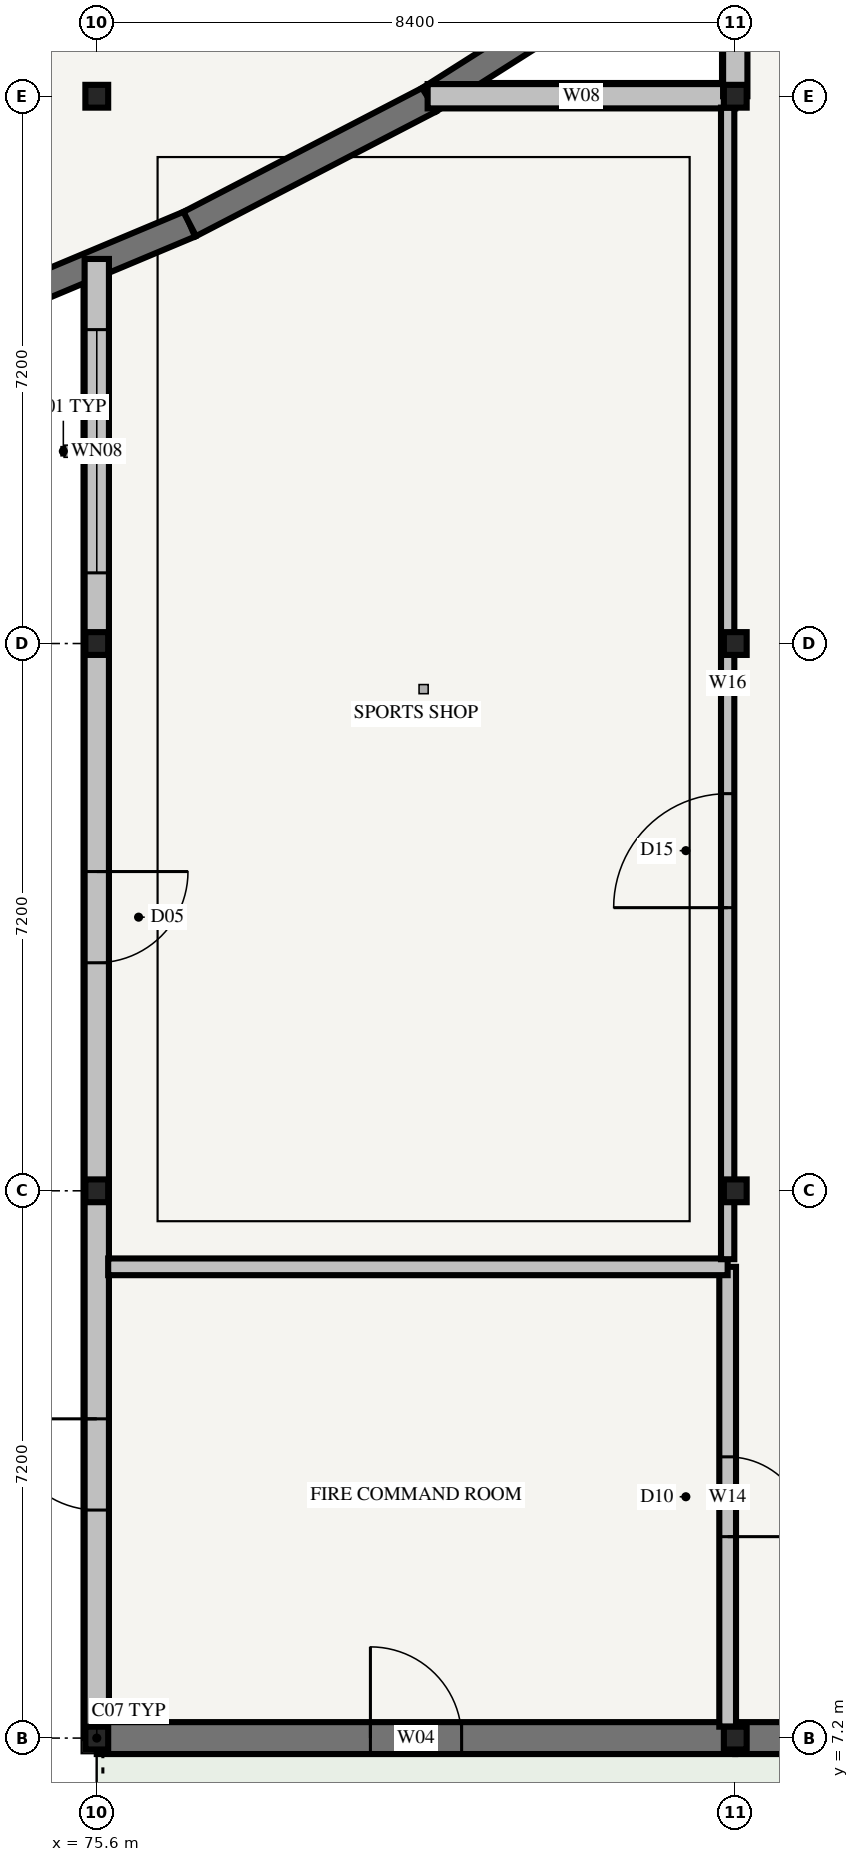
"""IFC4 building model, lengths in metres.
Left out: names, types, materials, properties, quantities, classifications, styles, units other than length and angle.
Written with IfcOpenShell. Run it as: python <this file> out.ifc"""

import sys

from ifc_helpers import new_model, si_unit, direction, frame, frame_2d, origin, origin_2d, place, context, subcontext, project, spatial, rectangle, i_section, extrude, element, fill, save


model = new_model("IFC4")
c1 = context("Model", 3, precision=1e-05, world=origin(), true_north=direction((0.0, 1.0)))
c2 = subcontext(c1, "Body", "Model", "MODEL_VIEW")
j1 = project(units=[si_unit("LENGTHUNIT", "METRE"), si_unit("PLANEANGLEUNIT", "RADIAN")], contexts=[c1])
p1 = place(None, origin())
s1 = spatial("IfcSite", under=j1, at=p1, CompositionType="ELEMENT")
p2 = place(p1, origin())
s2 = spatial("IfcBuilding", under=s1, at=p2, CompositionType="ELEMENT")
p3 = place(p2, origin())
s3 = spatial("IfcBuildingStorey", under=s2, at=p3, CompositionType="ELEMENT", Elevation=0.0)
for number, where, z_axis, x_axis in (
    (1, (75.6, 7.2, -0.42), (0.0, 0.0, 1.0), (1.0, 0.0, 0.0)),
    (2, (75.6, 14.4, -0.42), (0.0, 0.0, 1.0), (1.0, 0.0, 0.0)),
    (3, (75.6, 21.6, -0.42), (0.0, 0.0, 1.0), (1.0, 0.0, 0.0)),
    (4, (75.6, 28.8, -0.42), (0.0, 0.0, 1.0), (1.0, 0.0, 0.0)),
    (5, (84.0, 7.2, -0.42), (0.0, 0.0, 1.0), (1.0, 0.0, 0.0)),
    (6, (84.0, 14.4, -0.42), (0.0, 0.0, 1.0), (1.0, 0.0, 0.0)),
    (7, (84.0, 21.6, -0.42), (0.0, 0.0, 1.0), (1.0, 0.0, 0.0)),
    (8, (84.0, 28.8, -0.42), (0.0, 0.0, 1.0), (1.0, 0.0, 0.0)),
):
    element("IfcColumn", number, at=place(p3, frame(where, z_axis=z_axis, x_axis=x_axis)), inside=s3, PredefinedType="COLUMN", context=c2, shape_type="SweptSolid", body=[
        extrude(i_section(OverallWidth=0.3, OverallDepth=0.3, WebThickness=0.011, FlangeThickness=0.019, FilletRadius=0.027, at=origin_2d()), origin(), (0.0, 0.0, 1.0), 4.92),
    ])
p4 = place(p3, frame((73.456, 25.706, 0.0), z_axis=(0.0, 0.0, 1.0), x_axis=(0.922130522386, 0.386878921219, 0.0)))
e9 = element("IfcWall", 9, at=p4, inside=s3, PredefinedType="STANDARD", context=c2, shape_type="SweptSolid", body=[
    extrude(rectangle(XDim=3.651, YDim=0.36, at=frame_2d((1.826, 0.0))), origin(), (0.0, 0.0, 1.0), 4.01),
])
p5 = place(p3, frame((76.823, 27.119, 0.0), z_axis=(0.0, 0.0, 1.0), x_axis=(0.887548498586, 0.46071429613, 0.0)))
e10 = element("IfcWall", 10, at=p5, inside=s3, PredefinedType="STANDARD", context=c2, shape_type="SweptSolid", body=[
    extrude(rectangle(XDim=3.552, YDim=0.36, at=frame_2d((1.776, 0.0))), origin(), (0.0, 0.0, 1.0), 4.01),
])
p6 = place(p3, frame((79.976, 28.756, 0.0), z_axis=(0.0, 0.0, 1.0), x_axis=(0.844367033968, 0.535765164926, 0.0)))
e11 = element("IfcWall", 11, at=p6, inside=s3, PredefinedType="STANDARD", context=c2, shape_type="SweptSolid", body=[
    extrude(rectangle(XDim=3.445, YDim=0.36, at=frame_2d((1.722, 0.0))), origin(), (0.0, 0.0, 1.0), 4.01),
])
p7 = place(p3, frame((84.0, 28.8, 0.0), z_axis=(0.0, 0.0, 1.0), x_axis=(-1.0, 0.0, 0.0)))
e12 = element("IfcWall", 12, at=p7, inside=s3, PredefinedType="STANDARD", context=c2, shape_type="SweptSolid", body=[
    extrude(rectangle(XDim=4.047, YDim=0.32, at=frame_2d((2.023, 0.0))), origin(), (0.0, 0.0, 1.0), 3.705),
])
p8 = place(p3, frame((75.6, 26.659, 0.0), z_axis=(0.0, 0.0, 1.0), x_axis=(0.0, -1.0, 0.0)))
e13 = element("IfcWall", 13, at=p8, inside=s3, PredefinedType="STANDARD", context=c2, shape_type="SweptSolid", body=[
    extrude(rectangle(XDim=5.059, YDim=0.32, at=frame_2d((2.53, 0.0))), origin(), (0.0, 0.0, 1.0), 3.805),
])
p9 = place(p8, frame((0.93, 0.0, 2.1)))
e14 = element("IfcOpeningElement", 14, at=p9, cuts=e13, PredefinedType="OPENING", context=c2, shape_type="SweptSolid", body=[
    extrude(rectangle(XDim=3.2, YDim=1.2, at=frame_2d((1.6, 0.6))), frame((0.0, 0.185, 0.0), z_axis=(0.0, -1.0, 0.0), x_axis=(1.0, 0.0, 0.0)), (0.0, 0.0, 1.0), 0.37),
])
p10 = place(p3, frame((75.6, 21.6, 0.0), z_axis=(0.0, 0.0, 1.0), x_axis=(0.0, -1.0, 0.0)))
e15 = element("IfcWall", 15, at=p10, inside=s3, PredefinedType="STANDARD", context=c2, shape_type="SweptSolid", body=[
    extrude(rectangle(XDim=7.2, YDim=0.32, at=frame_2d((3.6, 0.0))), origin(), (0.0, 0.0, 1.0), 3.805),
])
p11 = place(p10, frame((3.0, 0.0, 0.0)))
e16 = element("IfcOpeningElement", 16, at=p11, cuts=e15, PredefinedType="OPENING", context=c2, shape_type="SweptSolid", body=[
    extrude(rectangle(XDim=1.2, YDim=2.25, at=frame_2d((0.6, 1.125))), frame((0.0, 0.185, 0.0), z_axis=(0.0, -1.0, 0.0), x_axis=(1.0, 0.0, 0.0)), (0.0, 0.0, 1.0), 0.37),
])
p12 = place(p3, frame((75.6, 14.4, 0.0), z_axis=(0.0, 0.0, 1.0), x_axis=(0.0, -1.0, 0.0)))
e17 = element("IfcWall", 17, at=p12, inside=s3, PredefinedType="STANDARD", context=c2, shape_type="SweptSolid", body=[
    extrude(rectangle(XDim=7.2, YDim=0.32, at=frame_2d((3.6, 0.0))), origin(), (0.0, 0.0, 1.0), 3.805),
])
p13 = place(p12, frame((3.0, 0.0, 0.0)))
e18 = element("IfcOpeningElement", 18, at=p13, cuts=e17, PredefinedType="OPENING", context=c2, shape_type="SweptSolid", body=[
    extrude(rectangle(XDim=1.2, YDim=2.25, at=frame_2d((0.6, 1.125))), frame((0.0, 0.185, 0.0), z_axis=(0.0, -1.0, 0.0), x_axis=(1.0, 0.0, 0.0)), (0.0, 0.0, 1.0), 0.37),
])
p14 = place(p3, frame((75.6, 7.2, 0.0), z_axis=(0.0, 0.0, 1.0), x_axis=(1.0, 0.0, 0.0)))
e19 = element("IfcWall", 19, at=p14, inside=s3, PredefinedType="SOLIDWALL", context=c2, shape_type="SweptSolid", body=[
    extrude(rectangle(XDim=8.4, YDim=0.42, at=frame_2d((4.2, 0.0))), origin(), (0.0, 0.0, 1.0), 3.805),
])
p15 = place(p14, frame((3.6, 0.0, 0.0)))
e20 = element("IfcOpeningElement", 20, at=p15, cuts=e19, PredefinedType="OPENING", context=c2, shape_type="SweptSolid", body=[
    extrude(rectangle(XDim=1.2, YDim=2.25, at=frame_2d((0.6, 1.125))), frame((0.0, 0.235, 0.0), z_axis=(0.0, -1.0, 0.0), x_axis=(1.0, 0.0, 0.0)), (0.0, 0.0, 1.0), 0.47),
])
p16 = place(p3, frame((84.0, 7.2, 0.0), z_axis=(0.0, 0.0, 1.0), x_axis=(1.0, 0.0, 0.0)))
e21 = element("IfcWall", 21, at=p16, inside=s3, PredefinedType="SOLIDWALL", context=c2, shape_type="SweptSolid", body=[
    extrude(rectangle(XDim=8.4, YDim=0.42, at=frame_2d((4.2, 0.0))), origin(), (0.0, 0.0, 1.0), 3.855),
])
p17 = place(p16, frame((3.0, 0.0, 0.0)))
e22 = element("IfcOpeningElement", 22, at=p17, cuts=e21, PredefinedType="OPENING", context=c2, shape_type="SweptSolid", body=[
    extrude(rectangle(XDim=2.4, YDim=2.7, at=frame_2d((1.2, 1.35))), frame((0.0, 0.235, 0.0), z_axis=(0.0, -1.0, 0.0), x_axis=(1.0, 0.0, 0.0)), (0.0, 0.0, 1.0), 0.47),
])
p18 = place(p3, frame((84.0, 31.525, 0.0), z_axis=(0.0, 0.0, 1.0), x_axis=(0.0, -1.0, 0.0)))
e23 = element("IfcWall", 23, at=p18, inside=s3, PredefinedType="STANDARD", context=c2, shape_type="SweptSolid", body=[
    extrude(rectangle(XDim=2.725, YDim=0.32, at=frame_2d((1.362, 0.0))), origin(), (0.0, 0.0, 1.0), 3.705),
])
p19 = place(p3, frame((83.9, 7.35, 0.0), z_axis=(0.0, 0.0, 1.0), x_axis=(0.0, 1.0, 0.0)))
e24 = element("IfcWall", 24, at=p19, inside=s3, PredefinedType="PARTITIONING", context=c2, shape_type="SweptSolid", body=[
    extrude(rectangle(XDim=6.05, YDim=0.22, at=frame_2d((3.025, 0.0))), origin(), (0.0, 0.0, 1.0), 3.62),
])
p20 = place(p19, frame((2.5, 0.0, 0.0)))
e25 = element("IfcOpeningElement", 25, at=p20, cuts=e24, PredefinedType="OPENING", context=c2, shape_type="SweptSolid", body=[
    extrude(rectangle(XDim=1.05, YDim=2.15, at=frame_2d((0.525, 1.075))), frame((0.0, 0.135, 0.0), z_axis=(0.0, -1.0, 0.0), x_axis=(1.0, 0.0, 0.0)), (0.0, 0.0, 1.0), 0.27),
])
p21 = place(p3, frame((75.75, 13.4, 0.0), z_axis=(0.0, 0.0, 1.0), x_axis=(1.0, 0.0, 0.0)))
e26 = element("IfcWall", 26, at=p21, inside=s3, PredefinedType="PARTITIONING", context=c2, shape_type="SweptSolid", body=[
    extrude(rectangle(XDim=8.15, YDim=0.22, at=frame_2d((4.075, 0.0))), origin(), (0.0, 0.0, 1.0), 3.62),
])
p22 = place(p3, frame((83.9, 13.5, 0.0), z_axis=(0.0, 0.0, 1.0), x_axis=(0.0, 1.0, 0.0)))
e27 = element("IfcWall", 27, at=p22, inside=s3, PredefinedType="PARTITIONING", context=c2, shape_type="SweptSolid", body=[
    extrude(rectangle(XDim=15.15, YDim=0.175, at=frame_2d((7.575, 0.0))), origin(), (0.0, 0.0, 1.0), 3.62),
])
p23 = place(p22, frame((4.625, 0.0, 0.0)))
e28 = element("IfcOpeningElement", 28, at=p23, cuts=e27, PredefinedType="OPENING", context=c2, shape_type="SweptSolid", body=[
    extrude(rectangle(XDim=1.5, YDim=2.2, at=frame_2d((0.75, 1.1))), frame((0.0, 0.112, 0.0), z_axis=(0.0, -1.0, 0.0), x_axis=(1.0, 0.0, 0.0)), (0.0, 0.0, 1.0), 0.225),
])
p24 = place(p9, origin())
e29 = element("IfcWindow", 29, at=p24, inside=s3, PartitioningType="SINGLE_PANEL", PredefinedType="WINDOW", context=c2, shape_type="SweptSolid", body=[
    extrude(rectangle(XDim=3.2, YDim=1.2, at=frame_2d((1.6, 0.6))), frame((0.0, 0.03, 0.0), z_axis=(0.0, -1.0, 0.0), x_axis=(1.0, 0.0, 0.0)), (0.0, 0.0, 1.0), 0.06),
])
fill(e14, e29)
p25 = place(p11, frame((1.2, 0.0, 0.0), z_axis=(0.0, 0.0, 1.0), x_axis=(-1.0, 0.0, 0.0)))
e30 = element("IfcDoor", 30, at=p25, inside=s3, OperationType="SINGLE_SWING_LEFT", PredefinedType="DOOR", context=c2, shape_type="SweptSolid", body=[
    extrude(rectangle(XDim=1.2, YDim=2.25, at=frame_2d((0.6, 1.125))), frame((0.0, 0.025, 0.0), z_axis=(0.0, -1.0, 0.0), x_axis=(1.0, 0.0, 0.0)), (0.0, 0.0, 1.0), 0.05),
])
fill(e16, e30)
p26 = place(p13, frame((1.2, 0.0, 0.0), z_axis=(0.0, 0.0, 1.0), x_axis=(-1.0, 0.0, 0.0)))
e31 = element("IfcDoor", 31, at=p26, inside=s3, OperationType="SINGLE_SWING_RIGHT", PredefinedType="DOOR", context=c2, shape_type="SweptSolid", body=[
    extrude(rectangle(XDim=1.2, YDim=2.25, at=frame_2d((0.6, 1.125))), frame((0.0, 0.025, 0.0), z_axis=(0.0, -1.0, 0.0), x_axis=(1.0, 0.0, 0.0)), (0.0, 0.0, 1.0), 0.05),
])
fill(e18, e31)
p27 = place(p15, frame((1.2, 0.0, 0.0), z_axis=(0.0, 0.0, 1.0), x_axis=(-1.0, 0.0, 0.0)))
e32 = element("IfcDoor", 32, at=p27, inside=s3, OperationType="SINGLE_SWING_LEFT", PredefinedType="DOOR", context=c2, shape_type="SweptSolid", body=[
    extrude(rectangle(XDim=1.2, YDim=2.25, at=frame_2d((0.6, 1.125))), frame((0.0, 0.025, 0.0), z_axis=(0.0, -1.0, 0.0), x_axis=(1.0, 0.0, 0.0)), (0.0, 0.0, 1.0), 0.05),
])
fill(e20, e32)
p28 = place(p20, origin())
e33 = element("IfcDoor", 33, at=p28, inside=s3, OperationType="SINGLE_SWING_RIGHT", PredefinedType="DOOR", context=c2, shape_type="SweptSolid", body=[
    extrude(rectangle(XDim=1.05, YDim=2.15, at=frame_2d((0.525, 1.075))), frame((0.0, 0.025, 0.0), z_axis=(0.0, -1.0, 0.0), x_axis=(1.0, 0.0, 0.0)), (0.0, 0.0, 1.0), 0.05),
])
fill(e25, e33)
p29 = place(p23, origin())
e34 = element("IfcDoor", 34, at=p29, inside=s3, OperationType="DOUBLE_DOOR_SINGLE_SWING", PredefinedType="DOOR", context=c2, shape_type="SweptSolid", body=[
    extrude(rectangle(XDim=1.5, YDim=2.2, at=frame_2d((0.75, 1.1))), frame((0.0, 0.025, 0.0), z_axis=(0.0, -1.0, 0.0), x_axis=(1.0, 0.0, 0.0)), (0.0, 0.0, 1.0), 0.05),
])
fill(e28, e34)
save(model, sys.argv[1])
